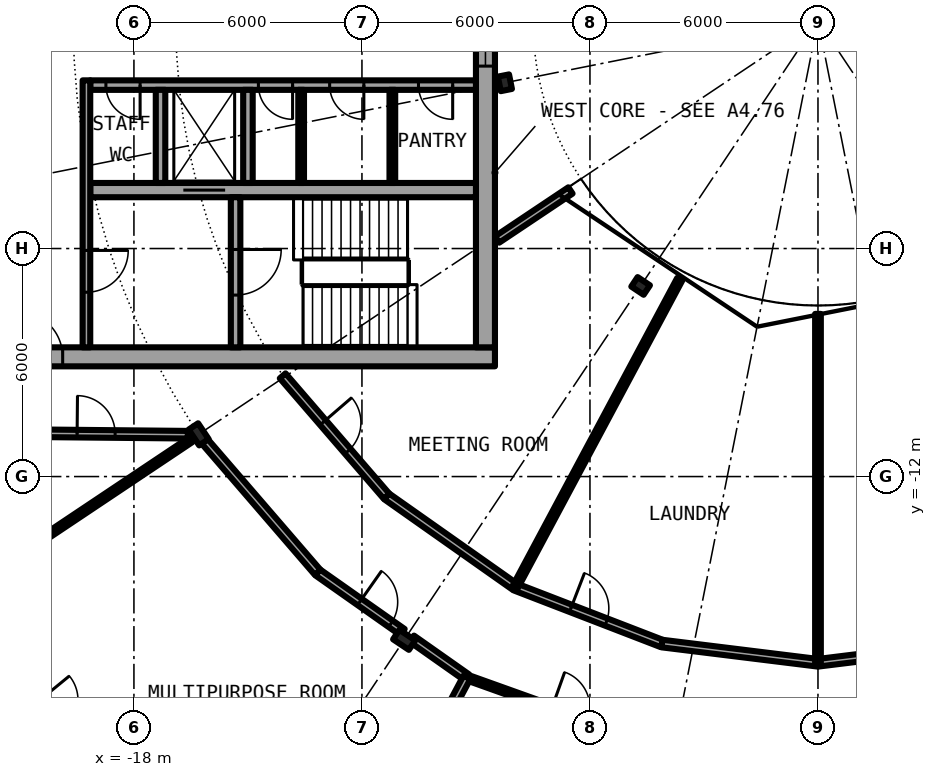
"""IFC4 building model, lengths in metres.
Left out: names, types, materials, properties, quantities, classifications, styles, units other than length and angle.
Written with IfcOpenShell. Run it as: python <this file> out.ifc"""

import sys

from ifc_helpers import new_model, si_unit, direction, frame, frame_2d, origin, origin_2d, place, context, subcontext, project, spatial, rectangle, i_section, extrude, element, fill, save


model = new_model("IFC4")
c1 = context("Model", 3, precision=1e-05, world=origin(), true_north=direction((0.0, 1.0)))
c2 = subcontext(c1, "Body", "Model", "MODEL_VIEW")
j1 = project(units=[si_unit("LENGTHUNIT", "METRE"), si_unit("PLANEANGLEUNIT", "RADIAN")], contexts=[c1])
p1 = place(None, origin())
s1 = spatial("IfcSite", under=j1, at=p1, CompositionType="ELEMENT")
p2 = place(p1, origin())
s2 = spatial("IfcBuilding", under=s1, at=p2, CompositionType="ELEMENT")
p3 = place(p2, frame((0.0, 0.0, 157.4)))
s3 = spatial("IfcBuildingStorey", under=s2, at=p3, CompositionType="ELEMENT", Elevation=157.4)
for number, where, z_axis, x_axis in (
    (1, (-16.297, -10.889, 0.0), (0.0, 0.0, 1.0), (-0.831, -0.556, 0.0)),
    (2, (-10.889, -16.297, 0.0), (0.0, 0.0, 1.0), (-0.556, -0.831, 0.0)),
):
    element("IfcColumn", number, at=place(p3, frame(where, z_axis=z_axis, x_axis=x_axis)), inside=s3, PredefinedType="COLUMN", context=c2, shape_type="SweptSolid", body=[
        extrude(i_section(OverallWidth=0.3, OverallDepth=0.5, WebThickness=0.014, FlangeThickness=0.028, FilletRadius=0.027, at=origin_2d()), origin(), (0.0, 0.0, 1.0), 4.2),
    ])
for number, where, z_axis, x_axis in (
    (3, (-8.239, -1.639, 0.0), (0.0, 0.0, 1.0), (-0.981, -0.195, 0.0)),
    (4, (-4.667, -6.984, 0.0), (0.0, 0.0, 1.0), (-0.556, -0.831, 0.0)),
):
    element("IfcColumn", number, at=place(p3, frame(where, z_axis=z_axis, x_axis=x_axis)), inside=s3, PredefinedType="COLUMN", context=c2, shape_type="SweptSolid", body=[
        extrude(i_section(OverallWidth=0.3, OverallDepth=0.39, WebThickness=0.011, FlangeThickness=0.019, FilletRadius=0.027, at=origin_2d()), origin(), (0.0, 0.0, 1.0), 4.2),
    ])
p4 = place(p3, frame((-22.699, -15.167, 0.0), z_axis=(0.0, 0.0, 1.0), x_axis=(0.634382322723, -0.773019449054, 0.0)))
e5 = element("IfcWall", 5, at=p4, inside=s3, PredefinedType="SOLIDWALL", context=c2, shape_type="SweptSolid", body=[
    extrude(rectangle(XDim=5.352, YDim=0.25, at=frame_2d((2.676, 0.0))), origin(), (0.0, 0.0, 1.0), 3.85),
])
p5 = place(p4, frame((0.841, 0.0, 0.0)))
e6 = element("IfcOpeningElement", 6, at=p5, cuts=e5, PredefinedType="OPENING", context=c2, shape_type="SweptSolid", body=[
    extrude(rectangle(XDim=1.0, YDim=2.2, at=frame_2d((0.5, 1.1))), frame((0.0, 0.135, 0.0), z_axis=(0.0, -1.0, 0.0), x_axis=(1.0, 0.0, 0.0)), (0.0, 0.0, 1.0), 0.27),
])
p6 = place(p4, frame((3.51, 0.0, 0.0)))
e7 = element("IfcOpeningElement", 7, at=p6, cuts=e5, PredefinedType="OPENING", context=c2, shape_type="SweptSolid", body=[
    extrude(rectangle(XDim=1.0, YDim=2.2, at=frame_2d((0.5, 1.1))), frame((0.0, 0.135, 0.0), z_axis=(0.0, -1.0, 0.0), x_axis=(1.0, 0.0, 0.0)), (0.0, 0.0, 1.0), 0.27),
])
p7 = place(p3, frame((-22.1, -8.85, 0.0), z_axis=(0.0, 0.0, 1.0), x_axis=(1.0, 0.0, 0.0)))
e8 = element("IfcWall", 8, at=p7, inside=s3, PredefinedType="SHEAR", context=c2, shape_type="SweptSolid", body=[
    extrude(rectangle(XDim=13.6, YDim=0.5, at=frame_2d((6.8, 0.0))), origin(), (0.0, 0.0, 1.0), 4.2),
])
p8 = place(p7, frame((1.025, 0.0, 0.0)))
e9 = element("IfcOpeningElement", 9, at=p8, cuts=e8, PredefinedType="OPENING", context=c2, shape_type="SweptSolid", body=[
    extrude(rectangle(XDim=1.2, YDim=2.3, at=frame_2d((0.6, 1.15))), frame((0.0, 0.26, 0.0), z_axis=(0.0, -1.0, 0.0), x_axis=(1.0, 0.0, 0.0)), (0.0, 0.0, 1.0), 0.52),
])
p9 = place(p3, frame((-8.75, 8.6, 0.0), z_axis=(0.0, 0.0, 1.0), x_axis=(0.0, -1.0, 0.0)))
e10 = element("IfcWall", 10, at=p9, inside=s3, PredefinedType="SHEAR", context=c2, shape_type="SweptSolid", body=[
    extrude(rectangle(XDim=17.2, YDim=0.5, at=frame_2d((8.6, 0.0))), origin(), (0.0, 0.0, 1.0), 4.2),
])
p10 = place(p9, frame((7.4, 0.0, 0.1)))
e11 = element("IfcOpeningElement", 11, at=p10, cuts=e10, PredefinedType="OPENING", context=c2, shape_type="SweptSolid", body=[
    extrude(rectangle(XDim=2.4, YDim=2.2, at=frame_2d((1.2, 1.1))), frame((0.0, 0.26, 0.0), z_axis=(0.0, -1.0, 0.0), x_axis=(1.0, 0.0, 0.0)), (0.0, 0.0, 1.0), 0.52),
])
p11 = place(p3, frame((-9.0, -1.7, 0.0), z_axis=(0.0, 0.0, 1.0), x_axis=(-1.0, 0.0, 0.0)))
e12 = element("IfcWall", 12, at=p11, inside=s3, PredefinedType="SHEAR", context=c2, shape_type="SweptSolid", body=[
    extrude(rectangle(XDim=10.15, YDim=0.25, at=frame_2d((5.075, 0.0))), origin(), (0.0, 0.0, 1.0), 4.2),
])
p12 = place(p11, frame((0.613, 0.0, 0.0)))
e13 = element("IfcOpeningElement", 13, at=p12, cuts=e12, PredefinedType="OPENING", context=c2, shape_type="SweptSolid", body=[
    extrude(rectangle(XDim=0.9, YDim=2.3, at=frame_2d((0.45, 1.15))), frame((0.0, 0.135, 0.0), z_axis=(0.0, -1.0, 0.0), x_axis=(1.0, 0.0, 0.0)), (0.0, 0.0, 1.0), 0.27),
])
p13 = place(p11, frame((2.95, 0.0, 0.0)))
e14 = element("IfcOpeningElement", 14, at=p13, cuts=e12, PredefinedType="OPENING", context=c2, shape_type="SweptSolid", body=[
    extrude(rectangle(XDim=0.9, YDim=2.3, at=frame_2d((0.45, 1.15))), frame((0.0, 0.135, 0.0), z_axis=(0.0, -1.0, 0.0), x_axis=(1.0, 0.0, 0.0)), (0.0, 0.0, 1.0), 0.27),
])
p14 = place(p11, frame((4.825, 0.0, 0.0)))
e15 = element("IfcOpeningElement", 15, at=p14, cuts=e12, PredefinedType="OPENING", context=c2, shape_type="SweptSolid", body=[
    extrude(rectangle(XDim=0.9, YDim=2.3, at=frame_2d((0.45, 1.15))), frame((0.0, 0.135, 0.0), z_axis=(0.0, -1.0, 0.0), x_axis=(1.0, 0.0, 0.0)), (0.0, 0.0, 1.0), 0.27),
])
p15 = place(p11, frame((8.837, 0.0, 0.0)))
e16 = element("IfcOpeningElement", 16, at=p15, cuts=e12, PredefinedType="OPENING", context=c2, shape_type="SweptSolid", body=[
    extrude(rectangle(XDim=0.9, YDim=2.3, at=frame_2d((0.45, 1.15))), frame((0.0, 0.135, 0.0), z_axis=(0.0, -1.0, 0.0), x_axis=(1.0, 0.0, 0.0)), (0.0, 0.0, 1.0), 0.27),
])
p16 = place(p3, frame((-9.0, -4.462, 0.0), z_axis=(0.0, 0.0, 1.0), x_axis=(-1.0, 0.0, 0.0)))
e17 = element("IfcWall", 17, at=p16, inside=s3, PredefinedType="SHEAR", context=c2, shape_type="SweptSolid", body=[
    extrude(rectangle(XDim=10.15, YDim=0.375, at=frame_2d((5.075, 0.0))), origin(), (0.0, 0.0, 1.0), 4.2),
])
p17 = place(p16, frame((6.6, 0.0, 0.0)))
e18 = element("IfcOpeningElement", 18, at=p17, cuts=e17, PredefinedType="OPENING", context=c2, shape_type="SweptSolid", body=[
    extrude(rectangle(XDim=1.1, YDim=2.3, at=frame_2d((0.55, 1.15))), frame((0.0, 0.198, 0.0), z_axis=(0.0, -1.0, 0.0), x_axis=(1.0, 0.0, 0.0)), (0.0, 0.0, 1.0), 0.395),
])
p18 = place(p3, frame((-15.325, -4.65, 0.0), z_axis=(0.0, 0.0, 1.0), x_axis=(0.0, -1.0, 0.0)))
e19 = element("IfcWall", 19, at=p18, inside=s3, PredefinedType="SHEAR", context=c2, shape_type="SweptSolid", body=[
    extrude(rectangle(XDim=3.95, YDim=0.25, at=frame_2d((1.975, 0.0))), origin(), (0.0, 0.0, 1.0), 4.2),
])
p19 = place(p18, frame((1.375, 0.0, 0.0)))
e20 = element("IfcOpeningElement", 20, at=p19, cuts=e19, PredefinedType="OPENING", context=c2, shape_type="SweptSolid", body=[
    extrude(rectangle(XDim=1.2, YDim=2.3, at=frame_2d((0.6, 1.15))), frame((0.0, 0.135, 0.0), z_axis=(0.0, -1.0, 0.0), x_axis=(1.0, 0.0, 0.0)), (0.0, 0.0, 1.0), 0.27),
])
for number, where, z_axis, x_axis in (
    (21, (-15.0, -1.825, 0.0), (0.0, 0.0, 1.0), (0.0, -1.0, 0.0)),
    (22, (-17.3, -1.825, 0.0), (0.0, 0.0, 1.0), (0.0, -1.0, 0.0)),
):
    element("IfcWall", number, at=place(p3, frame(where, z_axis=z_axis, x_axis=x_axis)), inside=s3, PredefinedType="SOLIDWALL", context=c2, shape_type="SweptSolid", body=[
        extrude(rectangle(XDim=2.45, YDim=0.25, at=frame_2d((1.225, 0.0))), origin(), (0.0, 0.0, 1.0), 3.85),
    ])
p20 = place(p3, frame((-19.25, -1.575, 0.0), z_axis=(0.0, 0.0, 1.0), x_axis=(0.0, -1.0, 0.0)))
e23 = element("IfcWall", 23, at=p20, inside=s3, PredefinedType="SOLIDWALL", context=c2, shape_type="SweptSolid", body=[
    extrude(rectangle(XDim=7.025, YDim=0.2, at=frame_2d((3.513, 0.0))), origin(), (0.0, 0.0, 1.0), 3.85),
])
p21 = place(p20, frame((4.475, 0.0, 0.0)))
e24 = element("IfcOpeningElement", 24, at=p21, cuts=e23, PredefinedType="OPENING", context=c2, shape_type="SweptSolid", body=[
    extrude(rectangle(XDim=1.1, YDim=2.3, at=frame_2d((0.55, 1.15))), frame((0.0, 0.11, 0.0), z_axis=(0.0, -1.0, 0.0), x_axis=(1.0, 0.0, 0.0)), (0.0, 0.0, 1.0), 0.22),
])
for number, where, z_axis, x_axis in (
    (25, (-11.2, -1.825, 0.0), (0.0, 0.0, 1.0), (0.0, -1.0, 0.0)),
    (26, (-13.6, -1.825, 0.0), (0.0, 0.0, 1.0), (0.0, -1.0, 0.0)),
):
    element("IfcWall", number, at=place(p3, frame(where, z_axis=z_axis, x_axis=x_axis)), inside=s3, PredefinedType="PARTITIONING", context=c2, shape_type="SweptSolid", body=[
        extrude(rectangle(XDim=2.45, YDim=0.15, at=frame_2d((1.225, 0.0))), origin(), (0.0, 0.0, 1.0), 3.85),
    ])
p22 = place(p3, frame((-16.198, -11.004, 0.0), z_axis=(0.0, 0.0, 1.0), x_axis=(0.653094461639, -0.757276451619, 0.0)))
e27 = element("IfcWall", 27, at=p22, inside=s3, PredefinedType="PARTITIONING", context=c2, shape_type="SweptSolid", body=[
    extrude(rectangle(XDim=4.647, YDim=0.2, at=frame_2d((2.323, 0.0))), origin(), (0.0, 0.0, 1.0), 3.54),
])
p23 = place(p3, frame((-13.163, -14.523, 0.0), z_axis=(0.0, 0.0, 1.0), x_axis=(0.817664396292, -0.57569517545, 0.0)))
e28 = element("IfcWall", 28, at=p23, inside=s3, PredefinedType="PARTITIONING", context=c2, shape_type="SweptSolid", body=[
    extrude(rectangle(XDim=2.727, YDim=0.2, at=frame_2d((1.364, 0.0))), origin(), (0.0, 0.0, 1.0), 3.54),
])
p24 = place(p23, frame((1.35, 0.0, 0.0)))
e29 = element("IfcOpeningElement", 29, at=p24, cuts=e28, PredefinedType="OPENING", context=c2, shape_type="SweptSolid", body=[
    extrude(rectangle(XDim=1.0, YDim=2.3, at=frame_2d((0.5, 1.15))), frame((0.0, 0.11, 0.0), z_axis=(0.0, -1.0, 0.0), x_axis=(1.0, 0.0, 0.0)), (0.0, 0.0, 1.0), 0.22),
])
p25 = place(p3, frame((-10.688, -16.266, 0.0), z_axis=(0.0, 0.0, 1.0), x_axis=(0.817772792535, -0.575541188613, 0.0)))
e30 = element("IfcWall", 30, at=p25, inside=s3, PredefinedType="PARTITIONING", context=c2, shape_type="SweptSolid", body=[
    extrude(rectangle(XDim=1.772, YDim=0.2, at=frame_2d((0.886, 0.0))), origin(), (0.0, 0.0, 1.0), 3.54),
])
p26 = place(p3, frame((-9.239, -17.286, 0.0), z_axis=(0.0, 0.0, 1.0), x_axis=(0.941550382061, -0.336872198379, 0.0)))
e31 = element("IfcWall", 31, at=p26, inside=s3, PredefinedType="PARTITIONING", context=c2, shape_type="SweptSolid", body=[
    extrude(rectangle(XDim=5.599, YDim=0.15, at=frame_2d((2.8, 0.0))), origin(), (0.0, 0.0, 1.0), 3.54),
])
p27 = place(p26, frame((2.376, 0.0, 0.0)))
e32 = element("IfcOpeningElement", 32, at=p27, cuts=e31, PredefinedType="OPENING", context=c2, shape_type="SweptSolid", body=[
    extrude(rectangle(XDim=1.0, YDim=2.3, at=frame_2d((0.5, 1.15))), frame((0.0, 0.085, 0.0), z_axis=(0.0, -1.0, 0.0), x_axis=(1.0, 0.0, 0.0)), (0.0, 0.0, 1.0), 0.17),
])
p28 = place(p3, frame((-14.086, -9.35, 0.0), z_axis=(0.0, 0.0, 1.0), x_axis=(0.653273870261, -0.757121687996, 0.0)))
e33 = element("IfcWall", 33, at=p28, inside=s3, PredefinedType="PARTITIONING", context=c2, shape_type="SweptSolid", body=[
    extrude(rectangle(XDim=4.189, YDim=0.2, at=frame_2d((2.095, 0.0))), origin(), (0.0, 0.0, 1.0), 3.85),
])
p29 = place(p28, frame((1.621, 0.0, 0.0)))
e34 = element("IfcOpeningElement", 34, at=p29, cuts=e33, PredefinedType="OPENING", context=c2, shape_type="SweptSolid", body=[
    extrude(rectangle(XDim=1.0, YDim=2.3, at=frame_2d((0.5, 1.15))), frame((0.0, 0.11, 0.0), z_axis=(0.0, -1.0, 0.0), x_axis=(1.0, 0.0, 0.0)), (0.0, 0.0, 1.0), 0.22),
])
p30 = place(p3, frame((-11.349, -12.522, 0.0), z_axis=(0.0, 0.0, 1.0), x_axis=(0.817567680547, -0.575832517079, 0.0)))
e35 = element("IfcWall", 35, at=p30, inside=s3, PredefinedType="PARTITIONING", context=c2, shape_type="SweptSolid", body=[
    extrude(rectangle(XDim=4.137, YDim=0.2, at=frame_2d((2.068, 0.0))), origin(), (0.0, 0.0, 1.0), 3.85),
])
p31 = place(p3, frame((-7.967, -14.904, 0.0), z_axis=(0.0, 0.0, 1.0), x_axis=(0.932943640288, -0.360022449363, 0.0)))
e36 = element("IfcWall", 36, at=p31, inside=s3, PredefinedType="PARTITIONING", context=c2, shape_type="SweptSolid", body=[
    extrude(rectangle(XDim=4.139, YDim=0.2, at=frame_2d((2.069, 0.0))), origin(), (0.0, 0.0, 1.0), 3.85),
])
p32 = place(p31, frame((1.569, 0.0, 0.0)))
e37 = element("IfcOpeningElement", 37, at=p32, cuts=e36, PredefinedType="OPENING", context=c2, shape_type="SweptSolid", body=[
    extrude(rectangle(XDim=1.0, YDim=2.3, at=frame_2d((0.5, 1.15))), frame((0.0, 0.11, 0.0), z_axis=(0.0, -1.0, 0.0), x_axis=(1.0, 0.0, 0.0)), (0.0, 0.0, 1.0), 0.22),
])
for number, where, z_axis, x_axis in (
    (38, (-4.106, -16.394, 0.0), (0.0, 0.0, 1.0), (0.992, -0.122, 0.0)),
    (39, (0.0, -16.9, 0.0), (0.0, 0.0, 1.0), (0.992, 0.122, 0.0)),
):
    element("IfcWall", number, at=place(p3, frame(where, z_axis=z_axis, x_axis=x_axis)), inside=s3, PredefinedType="PARTITIONING", context=c2, shape_type="SweptSolid", body=[
        extrude(rectangle(XDim=4.137, YDim=0.2, at=frame_2d((2.068, 0.0))), origin(), (0.0, 0.0, 1.0), 3.85),
    ])
p33 = place(p3, frame((-21.675, -10.85, 0.0), z_axis=(0.0, 0.0, 1.0), x_axis=(0.999954045313, -0.009586827528, 0.0)))
e40 = element("IfcWall", 40, at=p33, inside=s3, PredefinedType="PARTITIONING", context=c2, shape_type="SweptSolid", body=[
    extrude(rectangle(XDim=5.093, YDim=0.2, at=frame_2d((2.547, 0.0))), origin(), (0.0, 0.0, 1.0), 3.85),
])
p34 = place(p33, frame((2.18, 0.0, 0.0)))
e41 = element("IfcOpeningElement", 41, at=p34, cuts=e40, PredefinedType="OPENING", context=c2, shape_type="SweptSolid", body=[
    extrude(rectangle(XDim=1.0, YDim=2.3, at=frame_2d((0.5, 1.15))), frame((0.0, 0.11, 0.0), z_axis=(0.0, -1.0, 0.0), x_axis=(1.0, 0.0, 0.0)), (0.0, 0.0, 1.0), 0.22),
])
p35 = place(p3, frame((-6.513, -4.472, 0.0), z_axis=(0.0, 0.0, 1.0), x_axis=(-0.83133816625, -0.555766905579, 0.0)))
e42 = element("IfcWall", 42, at=p35, inside=s3, PredefinedType="PARTITIONING", context=c2, shape_type="SweptSolid", body=[
    extrude(rectangle(XDim=2.323, YDim=0.2, at=frame_2d((1.162, 0.0))), origin(), (0.0, 0.0, 1.0), 3.85),
])
p36 = place(p3, frame((-22.593, -15.101, 0.0), z_axis=(0.0, 0.0, 1.0), x_axis=(0.831419048668, 0.555645899393, 0.0)))
e43 = element("IfcWall", 43, at=p36, inside=s3, PredefinedType="PARTITIONING", context=c2, shape_type="SweptSolid", body=[
    extrude(rectangle(XDim=7.325, YDim=0.15, at=frame_2d((3.663, 0.0))), origin(), (0.0, 0.0, 1.0), 3.85),
])
p37 = place(p3, frame((-10.37, -19.402, 0.0), z_axis=(0.0, 0.0, 1.0), x_axis=(0.471385457832, 0.881927293004, 0.0)))
e44 = element("IfcWall", 44, at=p37, inside=s3, PredefinedType="PARTITIONING", context=c2, shape_type="SweptSolid", body=[
    extrude(rectangle(XDim=2.399, YDim=0.2, at=frame_2d((1.2, 0.0))), origin(), (0.0, 0.0, 1.0), 3.85),
])
p38 = place(p3, frame((-7.966, -14.905, 0.0), z_axis=(0.0, 0.0, 1.0), x_axis=(0.471460365694, 0.881887251059, 0.0)))
e45 = element("IfcWall", 45, at=p38, inside=s3, PredefinedType="PARTITIONING", context=c2, shape_type="SweptSolid", body=[
    extrude(rectangle(XDim=9.18, YDim=0.15, at=frame_2d((4.59, 0.0))), origin(), (0.0, 0.0, 1.0), 3.85),
])
p39 = place(p3, frame((0.0, -16.9, 0.0), z_axis=(0.0, 0.0, 1.0), x_axis=(0.0, 1.0, 0.0)))
e46 = element("IfcWall", 46, at=p39, inside=s3, PredefinedType="PARTITIONING", context=c2, shape_type="SweptSolid", body=[
    extrude(rectangle(XDim=9.18, YDim=0.15, at=frame_2d((4.59, 0.0))), origin(), (0.0, 0.0, 1.0), 3.85),
])
p40 = place(p17, origin())
e47 = element("IfcDoor", 47, at=p40, inside=s3, OperationType="DOUBLE_DOOR_SLIDING", PredefinedType="DOOR", context=c2, shape_type="SweptSolid", body=[
    extrude(rectangle(XDim=1.1, YDim=2.3, at=frame_2d((0.55, 1.15))), frame((0.0, 0.025, 0.0), z_axis=(0.0, -1.0, 0.0), x_axis=(1.0, 0.0, 0.0)), (0.0, 0.0, 1.0), 0.05),
])
fill(e18, e47)
p41 = place(p12, origin())
e48 = element("IfcDoor", 48, at=p41, inside=s3, OperationType="SINGLE_SWING_RIGHT", PredefinedType="DOOR", context=c2, shape_type="SweptSolid", body=[
    extrude(rectangle(XDim=0.9, YDim=2.3, at=frame_2d((0.45, 1.15))), frame((0.0, 0.025, 0.0), z_axis=(0.0, -1.0, 0.0), x_axis=(1.0, 0.0, 0.0)), (0.0, 0.0, 1.0), 0.05),
])
fill(e13, e48)
p42 = place(p13, origin())
e49 = element("IfcDoor", 49, at=p42, inside=s3, OperationType="SINGLE_SWING_RIGHT", PredefinedType="DOOR", context=c2, shape_type="SweptSolid", body=[
    extrude(rectangle(XDim=0.9, YDim=2.3, at=frame_2d((0.45, 1.15))), frame((0.0, 0.025, 0.0), z_axis=(0.0, -1.0, 0.0), x_axis=(1.0, 0.0, 0.0)), (0.0, 0.0, 1.0), 0.05),
])
fill(e14, e49)
p43 = place(p14, origin())
e50 = element("IfcDoor", 50, at=p43, inside=s3, OperationType="SINGLE_SWING_LEFT", PredefinedType="DOOR", context=c2, shape_type="SweptSolid", body=[
    extrude(rectangle(XDim=0.9, YDim=2.3, at=frame_2d((0.45, 1.15))), frame((0.0, 0.025, 0.0), z_axis=(0.0, -1.0, 0.0), x_axis=(1.0, 0.0, 0.0)), (0.0, 0.0, 1.0), 0.05),
])
fill(e15, e50)
p44 = place(p15, origin())
e51 = element("IfcDoor", 51, at=p44, inside=s3, OperationType="SINGLE_SWING_LEFT", PredefinedType="DOOR", context=c2, shape_type="SweptSolid", body=[
    extrude(rectangle(XDim=0.9, YDim=2.3, at=frame_2d((0.45, 1.15))), frame((0.0, 0.025, 0.0), z_axis=(0.0, -1.0, 0.0), x_axis=(1.0, 0.0, 0.0)), (0.0, 0.0, 1.0), 0.05),
])
fill(e16, e51)
p45 = place(p19, origin())
e52 = element("IfcDoor", 52, at=p45, inside=s3, OperationType="SINGLE_SWING_LEFT", PredefinedType="DOOR", context=c2, shape_type="SweptSolid", body=[
    extrude(rectangle(XDim=1.2, YDim=2.3, at=frame_2d((0.6, 1.15))), frame((0.0, 0.025, 0.0), z_axis=(0.0, -1.0, 0.0), x_axis=(1.0, 0.0, 0.0)), (0.0, 0.0, 1.0), 0.05),
])
fill(e20, e52)
p46 = place(p21, origin())
e53 = element("IfcDoor", 53, at=p46, inside=s3, OperationType="SINGLE_SWING_LEFT", PredefinedType="DOOR", context=c2, shape_type="SweptSolid", body=[
    extrude(rectangle(XDim=1.1, YDim=2.3, at=frame_2d((0.55, 1.15))), frame((0.0, 0.025, 0.0), z_axis=(0.0, -1.0, 0.0), x_axis=(1.0, 0.0, 0.0)), (0.0, 0.0, 1.0), 0.05),
])
fill(e24, e53)
p47 = place(p8, origin())
e54 = element("IfcDoor", 54, at=p47, inside=s3, OperationType="SINGLE_SWING_RIGHT", PredefinedType="DOOR", context=c2, shape_type="SweptSolid", body=[
    extrude(rectangle(XDim=1.2, YDim=2.3, at=frame_2d((0.6, 1.15))), frame((0.0, 0.025, 0.0), z_axis=(0.0, -1.0, 0.0), x_axis=(1.0, 0.0, 0.0)), (0.0, 0.0, 1.0), 0.05),
])
fill(e9, e54)
p48 = place(p10, origin())
e55 = element("IfcWindow", 55, at=p48, inside=s3, PartitioningType="SINGLE_PANEL", PredefinedType="WINDOW", context=c2, shape_type="SweptSolid", body=[
    extrude(rectangle(XDim=2.4, YDim=2.2, at=frame_2d((1.2, 1.1))), frame((0.0, 0.03, 0.0), z_axis=(0.0, -1.0, 0.0), x_axis=(1.0, 0.0, 0.0)), (0.0, 0.0, 1.0), 0.06),
])
fill(e11, e55)
p49 = place(p24, origin())
e56 = element("IfcDoor", 56, at=p49, inside=s3, OperationType="SINGLE_SWING_RIGHT", PredefinedType="DOOR", context=c2, shape_type="SweptSolid", body=[
    extrude(rectangle(XDim=1.0, YDim=2.3, at=frame_2d((0.5, 1.15))), frame((0.0, 0.025, 0.0), z_axis=(0.0, -1.0, 0.0), x_axis=(1.0, 0.0, 0.0)), (0.0, 0.0, 1.0), 0.05),
])
fill(e29, e56)
p50 = place(p29, origin())
e57 = element("IfcDoor", 57, at=p50, inside=s3, OperationType="SINGLE_SWING_LEFT", PredefinedType="DOOR", context=c2, shape_type="SweptSolid", body=[
    extrude(rectangle(XDim=1.0, YDim=2.3, at=frame_2d((0.5, 1.15))), frame((0.0, 0.025, 0.0), z_axis=(0.0, -1.0, 0.0), x_axis=(1.0, 0.0, 0.0)), (0.0, 0.0, 1.0), 0.05),
])
fill(e34, e57)
p51 = place(p32, origin())
e58 = element("IfcDoor", 58, at=p51, inside=s3, OperationType="SINGLE_SWING_LEFT", PredefinedType="DOOR", context=c2, shape_type="SweptSolid", body=[
    extrude(rectangle(XDim=1.0, YDim=2.3, at=frame_2d((0.5, 1.15))), frame((0.0, 0.025, 0.0), z_axis=(0.0, -1.0, 0.0), x_axis=(1.0, 0.0, 0.0)), (0.0, 0.0, 1.0), 0.05),
])
fill(e37, e58)
p52 = place(p34, origin())
e59 = element("IfcDoor", 59, at=p52, inside=s3, OperationType="SINGLE_SWING_RIGHT", PredefinedType="DOOR", context=c2, shape_type="SweptSolid", body=[
    extrude(rectangle(XDim=1.0, YDim=2.3, at=frame_2d((0.5, 1.15))), frame((0.0, 0.025, 0.0), z_axis=(0.0, -1.0, 0.0), x_axis=(1.0, 0.0, 0.0)), (0.0, 0.0, 1.0), 0.05),
])
fill(e41, e59)
save(model, sys.argv[1])
